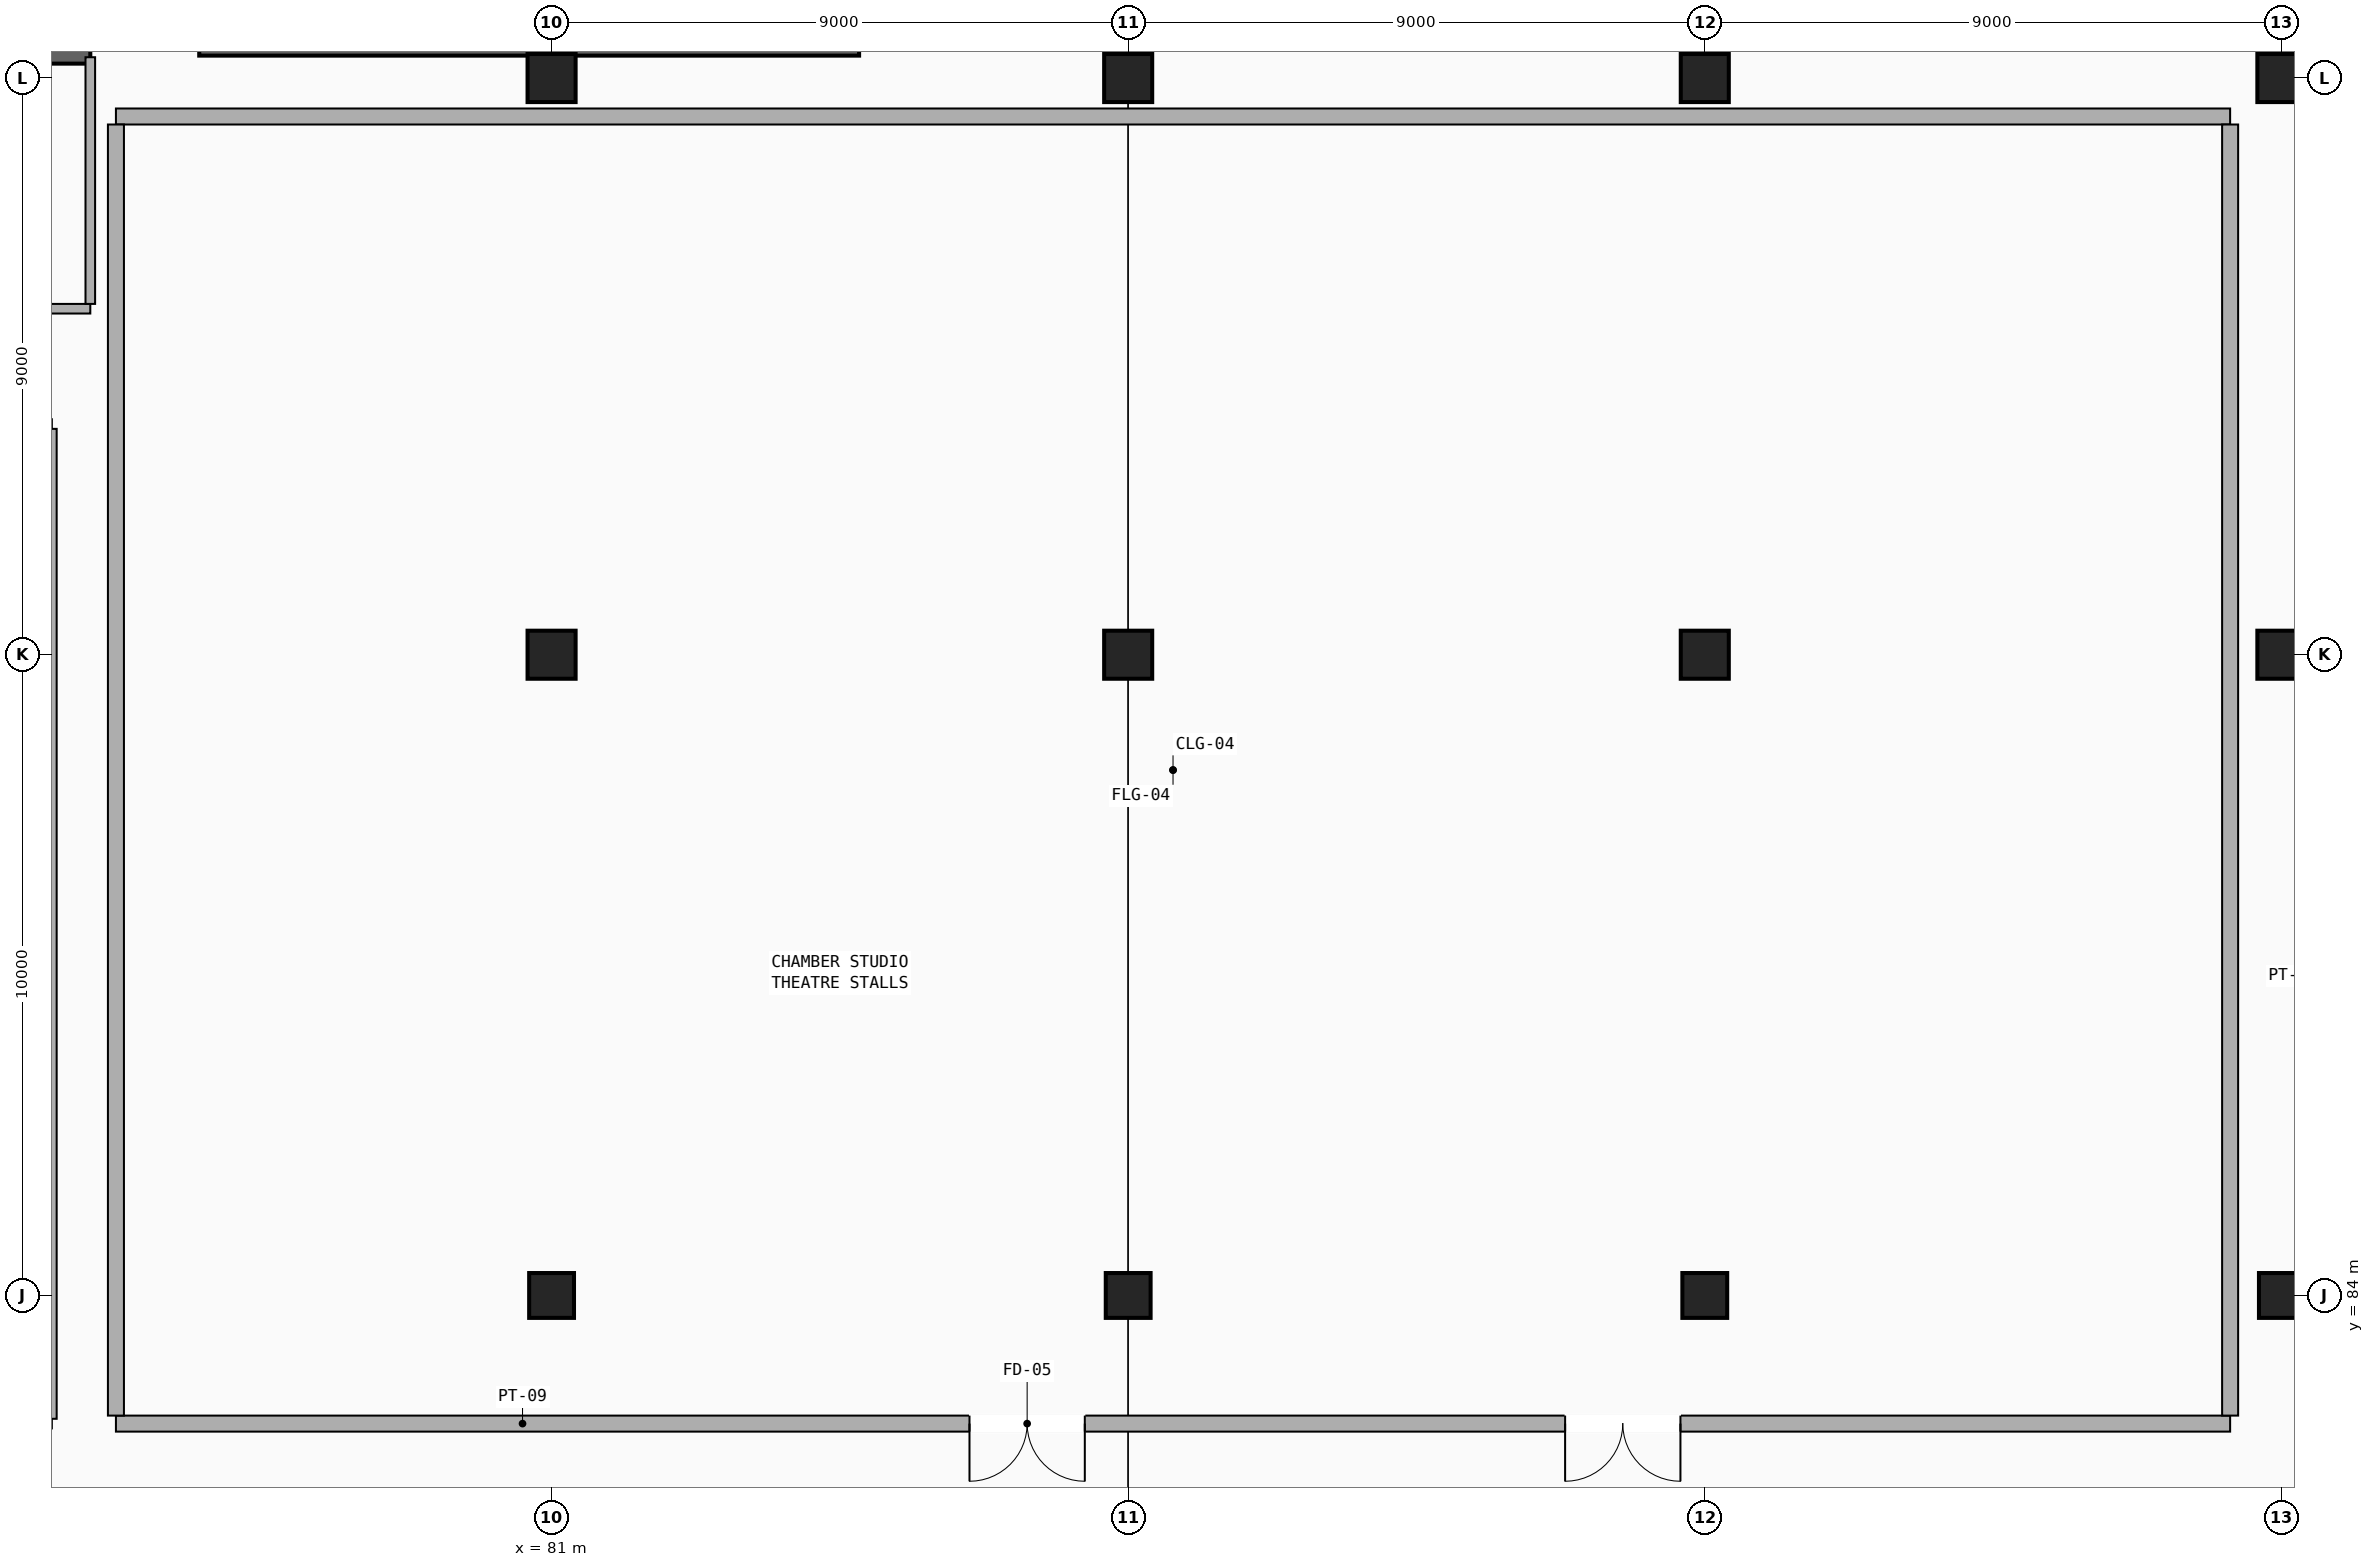
"""IFC4 building model, lengths in metres.
Left out: names, types, materials, properties, quantities, classifications, styles, units other than length and angle.
Written with IfcOpenShell. Run it as: python <this file> out.ifc"""

import sys

from ifc_helpers import new_model, si_unit, direction, frame, frame_2d, origin, origin_2d, place, context, subcontext, project, spatial, rectangle, extrude, element, fill, save


model = new_model("IFC4")
c1 = context("Model", 3, precision=1e-05, world=origin(), true_north=direction((0.0, 1.0)))
c2 = subcontext(c1, "Body", "Model", "MODEL_VIEW")
j1 = project(units=[si_unit("LENGTHUNIT", "METRE"), si_unit("PLANEANGLEUNIT", "RADIAN")], contexts=[c1])
p1 = place(None, origin())
s1 = spatial("IfcSite", under=j1, at=p1, CompositionType="ELEMENT")
p2 = place(p1, origin())
s2 = spatial("IfcBuilding", under=s1, at=p2, CompositionType="ELEMENT")
p3 = place(p2, frame((0.0, 0.0, 5.1)))
s3 = spatial("IfcBuildingStorey", under=s2, at=p3, CompositionType="ELEMENT", Elevation=5.1)
p4 = place(p3, frame((81.0, 84.0, 0.0), z_axis=(0.0, 0.0, 1.0), x_axis=(1.0, 0.0, 0.0)))
e1 = element("IfcColumn", 1, at=p4, inside=s3, PredefinedType="COLUMN", context=c2, shape_type="SweptSolid", body=[
    extrude(rectangle(XDim=0.7, YDim=0.7, at=origin_2d()), origin(), (0.0, 0.0, 1.0), 4.42),
])
for number, where, z_axis, x_axis in (
    (2, (81.0, 94.0, 0.0), (0.0, 0.0, 1.0), (1.0, 0.0, 0.0)),
    (3, (81.0, 103.0, 0.0), (0.0, 0.0, 1.0), (1.0, 0.0, 0.0)),
):
    element("IfcColumn", number, at=place(p3, frame(where, z_axis=z_axis, x_axis=x_axis)), inside=s3, PredefinedType="COLUMN", context=c2, shape_type="SweptSolid", body=[
        extrude(rectangle(XDim=0.75, YDim=0.75, at=origin_2d()), origin(), (0.0, 0.0, 1.0), 4.42),
    ])
p5 = place(p3, frame((90.0, 84.0, 0.0), z_axis=(0.0, 0.0, 1.0), x_axis=(1.0, 0.0, 0.0)))
e4 = element("IfcColumn", 4, at=p5, inside=s3, PredefinedType="COLUMN", context=c2, shape_type="SweptSolid", body=[
    extrude(rectangle(XDim=0.7, YDim=0.7, at=origin_2d()), origin(), (0.0, 0.0, 1.0), 4.42),
])
for number, where, z_axis, x_axis in (
    (5, (90.0, 94.0, 0.0), (0.0, 0.0, 1.0), (1.0, 0.0, 0.0)),
    (6, (90.0, 103.0, 0.0), (0.0, 0.0, 1.0), (1.0, 0.0, 0.0)),
):
    element("IfcColumn", number, at=place(p3, frame(where, z_axis=z_axis, x_axis=x_axis)), inside=s3, PredefinedType="COLUMN", context=c2, shape_type="SweptSolid", body=[
        extrude(rectangle(XDim=0.75, YDim=0.75, at=origin_2d()), origin(), (0.0, 0.0, 1.0), 4.42),
    ])
p6 = place(p3, frame((99.0, 84.0, 0.0), z_axis=(0.0, 0.0, 1.0), x_axis=(1.0, 0.0, 0.0)))
e7 = element("IfcColumn", 7, at=p6, inside=s3, PredefinedType="COLUMN", context=c2, shape_type="SweptSolid", body=[
    extrude(rectangle(XDim=0.7, YDim=0.7, at=origin_2d()), origin(), (0.0, 0.0, 1.0), 4.42),
])
for number, where, z_axis, x_axis in (
    (8, (99.0, 94.0, 0.0), (0.0, 0.0, 1.0), (1.0, 0.0, 0.0)),
    (9, (99.0, 103.0, 0.0), (0.0, 0.0, 1.0), (1.0, 0.0, 0.0)),
):
    element("IfcColumn", number, at=place(p3, frame(where, z_axis=z_axis, x_axis=x_axis)), inside=s3, PredefinedType="COLUMN", context=c2, shape_type="SweptSolid", body=[
        extrude(rectangle(XDim=0.75, YDim=0.75, at=origin_2d()), origin(), (0.0, 0.0, 1.0), 4.42),
    ])
p7 = place(p3, frame((108.0, 84.0, 0.0), z_axis=(0.0, 0.0, 1.0), x_axis=(1.0, 0.0, 0.0)))
e10 = element("IfcColumn", 10, at=p7, inside=s3, PredefinedType="COLUMN", context=c2, shape_type="SweptSolid", body=[
    extrude(rectangle(XDim=0.7, YDim=0.7, at=origin_2d()), origin(), (0.0, 0.0, 1.0), 4.42),
])
for number, where, z_axis, x_axis in (
    (11, (108.0, 94.0, 0.0), (0.0, 0.0, 1.0), (1.0, 0.0, 0.0)),
    (12, (108.0, 103.0, 0.0), (0.0, 0.0, 1.0), (1.0, 0.0, 0.0)),
):
    element("IfcColumn", number, at=place(p3, frame(where, z_axis=z_axis, x_axis=x_axis)), inside=s3, PredefinedType="COLUMN", context=c2, shape_type="SweptSolid", body=[
        extrude(rectangle(XDim=0.75, YDim=0.75, at=origin_2d()), origin(), (0.0, 0.0, 1.0), 4.42),
    ])
p8 = place(p3, frame((63.5, 103.4, 0.0), z_axis=(0.0, 0.0, 1.0), x_axis=(1.0, 0.0, 0.0)))
e13 = element("IfcWall", 13, at=p8, inside=s3, PredefinedType="SHEAR", context=c2, shape_type="SweptSolid", body=[
    extrude(rectangle(XDim=10.3, YDim=0.35, at=frame_2d((5.15, 0.0))), origin(), (0.0, 0.0, 1.0), 4.42),
])
p9 = place(p8, frame((0.45, 0.0, 0.0)))
e14 = element("IfcOpeningElement", 14, at=p9, cuts=e13, PredefinedType="OPENING", context=c2, shape_type="SweptSolid", body=[
    extrude(rectangle(XDim=1.1, YDim=2.2, at=frame_2d((0.55, 1.1))), frame((0.0, 0.185, 0.0), z_axis=(0.0, -1.0, 0.0), x_axis=(1.0, 0.0, 0.0)), (0.0, 0.0, 1.0), 0.37),
])
p10 = place(p8, frame((5.54, 0.0, 0.0)))
e15 = element("IfcOpeningElement", 15, at=p10, cuts=e13, PredefinedType="OPENING", context=c2, shape_type="SweptSolid", body=[
    extrude(rectangle(XDim=1.12, YDim=2.16, at=frame_2d((0.56, 1.08))), frame((0.0, 0.185, 0.0), z_axis=(0.0, -1.0, 0.0), x_axis=(1.0, 0.0, 0.0)), (0.0, 0.0, 1.0), 0.37),
])
p11 = place(p3, frame((75.5, 103.5, 0.0), z_axis=(0.0, 0.0, 1.0), x_axis=(1.0, 0.0, 0.0)))
e16 = element("IfcWall", 16, at=p11, inside=s3, PredefinedType="SHEAR", context=c2, shape_type="SweptSolid", body=[
    extrude(rectangle(XDim=10.3, YDim=0.3, at=frame_2d((5.15, 0.0))), origin(), (0.0, 0.0, 1.0), 4.42),
])
p12 = place(p3, frame((63.5, 99.4, 0.0), z_axis=(0.0, 0.0, 1.0), x_axis=(1.0, 0.0, 0.0)))
e17 = element("IfcWall", 17, at=p12, inside=s3, PredefinedType="PARTITIONING", context=c2, shape_type="SweptSolid", body=[
    extrude(rectangle(XDim=10.3, YDim=0.15, at=frame_2d((5.15, 0.0))), origin(), (0.0, 0.0, 1.0), 3.46),
])
p13 = place(p12, frame((4.45, 0.0, 0.0)))
e18 = element("IfcOpeningElement", 18, at=p13, cuts=e17, PredefinedType="OPENING", context=c2, shape_type="SweptSolid", body=[
    extrude(rectangle(XDim=1.4, YDim=2.2, at=frame_2d((0.7, 1.1))), frame((0.0, 0.085, 0.0), z_axis=(0.0, -1.0, 0.0), x_axis=(1.0, 0.0, 0.0)), (0.0, 0.0, 1.0), 0.17),
])
p14 = place(p3, frame((73.8, 99.475, 0.0), z_axis=(0.0, 0.0, 1.0), x_axis=(0.0, 1.0, 0.0)))
e19 = element("IfcWall", 19, at=p14, inside=s3, PredefinedType="PARTITIONING", context=c2, shape_type="SweptSolid", body=[
    extrude(rectangle(XDim=3.85, YDim=0.15, at=frame_2d((1.925, 0.0))), origin(), (0.0, 0.0, 1.0), 3.39),
])
p15 = place(p3, frame((74.2, 82.0, 0.0), z_axis=(0.0, 0.0, 1.0), x_axis=(1.0, 0.0, 0.0)))
e20 = element("IfcWall", 20, at=p15, inside=s3, PredefinedType="PARTITIONING", context=c2, shape_type="SweptSolid", body=[
    extrude(rectangle(XDim=33.0, YDim=0.25, at=frame_2d((16.5, 0.0))), origin(), (0.0, 0.0, 1.0), 3.46),
])
p16 = place(p15, frame((13.323, 0.0, 0.0)))
e21 = element("IfcOpeningElement", 21, at=p16, cuts=e20, PredefinedType="OPENING", context=c2, shape_type="SweptSolid", body=[
    extrude(rectangle(XDim=1.8, YDim=2.3, at=frame_2d((0.9, 1.15))), frame((0.0, 0.135, 0.0), z_axis=(0.0, -1.0, 0.0), x_axis=(1.0, 0.0, 0.0)), (0.0, 0.0, 1.0), 0.27),
])
p17 = place(p15, frame((22.62, 0.0, 0.0)))
e22 = element("IfcOpeningElement", 22, at=p17, cuts=e20, PredefinedType="OPENING", context=c2, shape_type="SweptSolid", body=[
    extrude(rectangle(XDim=1.8, YDim=2.3, at=frame_2d((0.9, 1.15))), frame((0.0, 0.135, 0.0), z_axis=(0.0, -1.0, 0.0), x_axis=(1.0, 0.0, 0.0)), (0.0, 0.0, 1.0), 0.27),
])
p18 = place(p3, frame((74.2, 102.4, 0.0), z_axis=(0.0, 0.0, 1.0), x_axis=(1.0, 0.0, 0.0)))
e23 = element("IfcWall", 23, at=p18, inside=s3, PredefinedType="PARTITIONING", context=c2, shape_type="SweptSolid", body=[
    extrude(rectangle(XDim=33.0, YDim=0.25, at=frame_2d((16.5, 0.0))), origin(), (0.0, 0.0, 1.0), 3.29),
])
for number, where, z_axis, x_axis in (
    (24, (74.2, 82.125, 0.0), (0.0, 0.0, 1.0), (0.0, 1.0, 0.0)),
    (25, (107.2, 82.125, 0.0), (0.0, 0.0, 1.0), (0.0, 1.0, 0.0)),
):
    element("IfcWall", number, at=place(p3, frame(where, z_axis=z_axis, x_axis=x_axis)), inside=s3, PredefinedType="PARTITIONING", context=c2, shape_type="SweptSolid", body=[
        extrude(rectangle(XDim=20.15, YDim=0.25, at=frame_2d((10.075, 0.0))), origin(), (0.0, 0.0, 1.0), 3.24),
    ])
p19 = place(p3, frame((73.2, 82.075, 0.0), z_axis=(0.0, 0.0, 1.0), x_axis=(0.0, 1.0, 0.0)))
e26 = element("IfcWall", 26, at=p19, inside=s3, PredefinedType="PARTITIONING", context=c2, shape_type="SweptSolid", body=[
    extrude(rectangle(XDim=15.45, YDim=0.15, at=frame_2d((7.725, 0.0))), origin(), (0.0, 0.0, 1.0), 3.24),
])
p20 = place(p16, frame((1.8, 0.0, 0.0), z_axis=(0.0, 0.0, 1.0), x_axis=(-1.0, 0.0, 0.0)))
e27 = element("IfcDoor", 27, at=p20, inside=s3, OperationType="DOUBLE_DOOR_SINGLE_SWING", PredefinedType="DOOR", context=c2, shape_type="SweptSolid", body=[
    extrude(rectangle(XDim=1.8, YDim=2.3, at=frame_2d((0.9, 1.15))), frame((0.0, 0.025, 0.0), z_axis=(0.0, -1.0, 0.0), x_axis=(1.0, 0.0, 0.0)), (0.0, 0.0, 1.0), 0.05),
])
fill(e21, e27)
p21 = place(p17, frame((1.8, 0.0, 0.0), z_axis=(0.0, 0.0, 1.0), x_axis=(-1.0, 0.0, 0.0)))
e28 = element("IfcDoor", 28, at=p21, inside=s3, OperationType="DOUBLE_DOOR_SINGLE_SWING", PredefinedType="DOOR", context=c2, shape_type="SweptSolid", body=[
    extrude(rectangle(XDim=1.8, YDim=2.3, at=frame_2d((0.9, 1.15))), frame((0.0, 0.025, 0.0), z_axis=(0.0, -1.0, 0.0), x_axis=(1.0, 0.0, 0.0)), (0.0, 0.0, 1.0), 0.05),
])
fill(e22, e28)
save(model, sys.argv[1])
